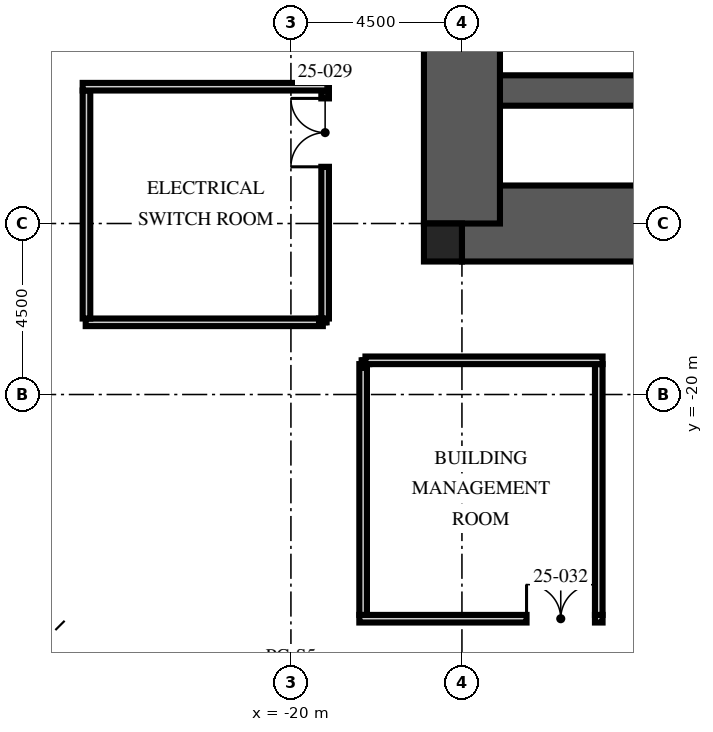
"""IFC4 building model, lengths in metres.
Left out: names, types, materials, properties, quantities, classifications, styles, units other than length and angle.
Written with IfcOpenShell. Run it as: python <this file> out.ifc"""

import sys

from ifc_helpers import new_model, si_unit, direction, frame, frame_2d, origin, origin_2d, place, context, subcontext, project, spatial, rectangle, hollow_rectangle, extrude, element, fill, save


model = new_model("IFC4")
c1 = context("Model", 3, precision=1e-05, world=origin(), true_north=direction((0.0, 1.0)))
c2 = subcontext(c1, "Body", "Model", "MODEL_VIEW")
j1 = project(units=[si_unit("LENGTHUNIT", "METRE"), si_unit("PLANEANGLEUNIT", "RADIAN")], contexts=[c1])
p1 = place(None, origin())
s1 = spatial("IfcSite", under=j1, at=p1, CompositionType="ELEMENT")
p2 = place(p1, origin())
s2 = spatial("IfcBuilding", under=s1, at=p2, CompositionType="ELEMENT")
p3 = place(p2, frame((0.0, 0.0, 99.75)))
s3 = spatial("IfcBuildingStorey", under=s2, at=p3, CompositionType="ELEMENT", Elevation=99.75)
p4 = place(p3, frame((-15.5, -15.5, -0.35), z_axis=(0.0, 0.0, 1.0), x_axis=(1.0, 0.0, 0.0)))
e1 = element("IfcWall", 1, at=p4, inside=s3, PredefinedType="SHEAR", context=c2, shape_type="SweptSolid", body=[
    extrude(rectangle(XDim=31.0, YDim=2.0, at=frame_2d((15.5, 0.0))), origin(), (0.0, 0.0, 1.0), 7.6),
])
p5 = place(p3, frame((-15.5, -12.0, -0.35), z_axis=(0.0, 0.0, 1.0), x_axis=(1.0, 0.0, 0.0)))
e2 = element("IfcWall", 2, at=p5, inside=s3, PredefinedType="SHEAR", context=c2, shape_type="SweptSolid", body=[
    extrude(rectangle(XDim=31.0, YDim=0.8, at=frame_2d((15.5, 0.0))), origin(), (0.0, 0.0, 1.0), 7.6),
])
p6 = place(p3, frame((-15.5, -15.5, -0.35), z_axis=(0.0, 0.0, 1.0), x_axis=(0.0, 1.0, 0.0)))
e3 = element("IfcWall", 3, at=p6, inside=s3, PredefinedType="SHEAR", context=c2, shape_type="SweptSolid", body=[
    extrude(rectangle(XDim=31.0, YDim=2.0, at=frame_2d((15.5, 0.0))), origin(), (0.0, 0.0, 1.0), 7.6),
])
p7 = place(p6, frame((6.5, 0.0, 0.35)))
e4 = element("IfcOpeningElement", 4, at=p7, cuts=e3, PredefinedType="OPENING", context=c2, shape_type="SweptSolid", body=[
    extrude(rectangle(XDim=1.2, YDim=2.1, at=frame_2d((0.6, 1.05))), frame((0.0, 1.01, 0.0), z_axis=(0.0, -1.0, 0.0), x_axis=(1.0, 0.0, 0.0)), (0.0, 0.0, 1.0), 2.02),
])
p8 = place(p6, frame((22.7, 0.0, 0.35)))
e5 = element("IfcOpeningElement", 5, at=p8, cuts=e3, PredefinedType="OPENING", context=c2, shape_type="SweptSolid", body=[
    extrude(rectangle(XDim=1.8, YDim=2.1, at=frame_2d((0.9, 1.05))), frame((0.0, 1.01, 0.0), z_axis=(0.0, -1.0, 0.0), x_axis=(1.0, 0.0, 0.0)), (0.0, 0.0, 1.0), 2.02),
])
p9 = place(p3, frame((-16.0, -16.0, -0.35), z_axis=(0.0, 0.0, 1.0), x_axis=(1.0, 0.0, 0.0)))
e6 = element("IfcColumn", 6, at=p9, inside=s3, PredefinedType="COLUMN", context=c2, shape_type="SweptSolid", body=[
    extrude(rectangle(XDim=1.0, YDim=1.0, at=origin_2d()), origin(), (0.0, 0.0, 1.0), 7.6),
])
p10 = place(p3, frame((-10.0, -29.8, -0.65), z_axis=(0.103601510687, 0.332963994967, 0.937230870724), x_axis=(0.994618884766, -0.034712905596, -0.097612951251)))
e7 = element("IfcColumn", 7, at=p10, inside=s3, PredefinedType="COLUMN", context=c2, shape_type="SweptSolid", body=[
    extrude(hollow_rectangle(XDim=3.2, YDim=1.8, WallThickness=0.2, at=origin_2d()), origin(), (0.0, 0.0, 1.0), 8.109),
])
for number, where, z_axis, x_axis in (
    (8, (-20.0, -29.8, -0.65), (0.204, 0.328, 0.923), (0.979, -0.068, -0.192)),
    (9, (-29.8, -20.0, -0.65), (0.328, 0.204, 0.923), (-0.068, 0.979, -0.192)),
):
    element("IfcColumn", number, at=place(p3, frame(where, z_axis=z_axis, x_axis=x_axis)), inside=s3, PredefinedType="COLUMN", context=c2, shape_type="SweptSolid", body=[
        extrude(hollow_rectangle(XDim=3.2, YDim=1.8, WallThickness=0.2, at=origin_2d()), origin(), (0.0, 0.0, 1.0), 8.238),
    ])
p11 = place(p3, frame((-29.8, -10.0, -0.65), z_axis=(0.332963994967, 0.103601510687, 0.937230870724), x_axis=(-0.034712905596, 0.994618884766, -0.097612951251)))
e10 = element("IfcColumn", 10, at=p11, inside=s3, PredefinedType="COLUMN", context=c2, shape_type="SweptSolid", body=[
    extrude(hollow_rectangle(XDim=3.2, YDim=1.8, WallThickness=0.2, at=origin_2d()), origin(), (0.0, 0.0, 1.0), 8.109),
])
p12 = place(p3, frame((-28.394, -28.394, -0.65), z_axis=(0.300622896132, 0.300622896132, 0.905125266824), x_axis=(0.707106781187, -0.707106781187, 0.0)))
e11 = element("IfcColumn", 11, at=p12, inside=s3, PredefinedType="COLUMN", context=c2, shape_type="SweptSolid", body=[
    extrude(hollow_rectangle(XDim=1.6, YDim=1.6, WallThickness=0.1, at=origin_2d()), origin(), (0.0, 0.0, 1.0), 8.396),
])
p13 = place(p3, frame((-18.2, -25.9, 0.0), z_axis=(0.0, 0.0, 1.0), x_axis=(1.0, 0.0, 0.0)))
e12 = element("IfcWall", 12, at=p13, inside=s3, PredefinedType="SOLIDWALL", context=c2, shape_type="SweptSolid", body=[
    extrude(rectangle(XDim=6.4, YDim=0.2, at=frame_2d((3.2, 0.0))), origin(), (0.0, 0.0, 1.0), 6.45),
])
p14 = place(p13, frame((4.4, 0.0, 0.0)))
e13 = element("IfcOpeningElement", 13, at=p14, cuts=e12, PredefinedType="OPENING", context=c2, shape_type="SweptSolid", body=[
    extrude(rectangle(XDim=1.8, YDim=2.4, at=frame_2d((0.9, 1.2))), frame((0.0, 0.11, 0.0), z_axis=(0.0, -1.0, 0.0), x_axis=(1.0, 0.0, 0.0)), (0.0, 0.0, 1.0), 0.22),
])
p15 = place(p3, frame((-18.1, -25.8, 0.0), z_axis=(0.0, 0.0, 1.0), x_axis=(0.0, 1.0, 0.0)))
e14 = element("IfcWall", 14, at=p15, inside=s3, PredefinedType="SOLIDWALL", context=c2, shape_type="SweptSolid", body=[
    extrude(rectangle(XDim=6.6, YDim=0.2, at=frame_2d((3.3, 0.0))), origin(), (0.0, 0.0, 1.0), 6.45),
])
p16 = place(p3, frame((-11.9, -25.8, 0.0), z_axis=(0.0, 0.0, 1.0), x_axis=(0.0, 1.0, 0.0)))
e15 = element("IfcWall", 15, at=p16, inside=s3, PredefinedType="SOLIDWALL", context=c2, shape_type="SweptSolid", body=[
    extrude(rectangle(XDim=6.6, YDim=0.2, at=frame_2d((3.3, 0.0))), origin(), (0.0, 0.0, 1.0), 7.25),
])
p17 = place(p3, frame((-18.039, -19.2, 0.0), z_axis=(0.0, 0.0, 1.0), x_axis=(-1.0, 0.0, 0.0)))
e16 = element("IfcWall", 16, at=p17, inside=s3, PredefinedType="SOLIDWALL", context=c2, shape_type="SweptSolid", body=[
    extrude(rectangle(XDim=0.061, YDim=0.2, at=frame_2d((0.03, 0.0))), origin(), (0.0, 0.0, 1.0), 7.25),
])
p18 = place(p3, frame((-18.039, -19.1, 0.0), z_axis=(0.0, 0.0, 1.0), x_axis=(0.0, -1.0, 0.0)))
e17 = element("IfcWall", 17, at=p18, inside=s3, PredefinedType="SOLIDWALL", context=c2, shape_type="SweptSolid", body=[
    extrude(rectangle(XDim=0.1, YDim=0.2, at=frame_2d((0.05, 0.0))), origin(), (0.0, 0.0, 1.0), 7.25),
])
p19 = place(p3, frame((-18.039, -19.1, 0.0), z_axis=(0.0, 0.0, 1.0), x_axis=(1.0, 0.0, 0.0)))
e18 = element("IfcWall", 18, at=p19, inside=s3, PredefinedType="SOLIDWALL", context=c2, shape_type="SweptSolid", body=[
    extrude(rectangle(XDim=6.239, YDim=0.2, at=frame_2d((3.12, 0.0))), origin(), (0.0, 0.0, 1.0), 6.46),
])
p20 = place(p3, frame((-25.4, -18.1, 0.0), z_axis=(0.0, 0.0, 1.0), x_axis=(1.0, 0.0, 0.0)))
e19 = element("IfcWall", 19, at=p20, inside=s3, PredefinedType="SOLIDWALL", context=c2, shape_type="SweptSolid", body=[
    extrude(rectangle(XDim=6.239, YDim=0.2, at=frame_2d((3.12, 0.0))), origin(), (0.0, 0.0, 1.0), 6.45),
])
p21 = place(p3, frame((-19.161, -18.1, 0.0), z_axis=(0.0, 0.0, 1.0), x_axis=(0.0, 1.0, 0.0)))
e20 = element("IfcWall", 20, at=p21, inside=s3, PredefinedType="SOLIDWALL", context=c2, shape_type="SweptSolid", body=[
    extrude(rectangle(XDim=0.1, YDim=0.2, at=frame_2d((0.05, 0.0))), origin(), (0.0, 0.0, 1.0), 7.25),
])
p22 = place(p3, frame((-25.38, -18.0, 0.0), z_axis=(0.0, 0.0, 1.0), x_axis=(0.0, 1.0, 0.0)))
e21 = element("IfcWall", 21, at=p22, inside=s3, PredefinedType="SOLIDWALL", context=c2, shape_type="SweptSolid", body=[
    extrude(rectangle(XDim=6.0, YDim=0.2, at=frame_2d((3.0, 0.0))), origin(), (0.0, 0.0, 1.0), 6.46),
])
p23 = place(p3, frame((-19.161, -18.0, 0.0), z_axis=(0.0, 0.0, 1.0), x_axis=(1.0, 0.0, 0.0)))
e22 = element("IfcWall", 22, at=p23, inside=s3, PredefinedType="SOLIDWALL", context=c2, shape_type="SweptSolid", body=[
    extrude(rectangle(XDim=0.061, YDim=0.2, at=frame_2d((0.03, 0.0))), origin(), (0.0, 0.0, 1.0), 7.25),
])
p24 = place(p3, frame((-19.1, -18.0, 0.0), z_axis=(0.0, 0.0, 1.0), x_axis=(0.0, 1.0, 0.0)))
e23 = element("IfcWall", 23, at=p24, inside=s3, PredefinedType="SOLIDWALL", context=c2, shape_type="SweptSolid", body=[
    extrude(rectangle(XDim=6.0, YDim=0.2, at=frame_2d((3.0, 0.0))), origin(), (0.0, 0.0, 1.0), 6.46),
])
p25 = place(p24, frame((3.992, 0.0, 0.0)))
e24 = element("IfcOpeningElement", 24, at=p25, cuts=e23, PredefinedType="OPENING", context=c2, shape_type="SweptSolid", body=[
    extrude(rectangle(XDim=1.8, YDim=2.4, at=frame_2d((0.9, 1.2))), frame((0.0, 0.11, 0.0), z_axis=(0.0, -1.0, 0.0), x_axis=(1.0, 0.0, 0.0)), (0.0, 0.0, 1.0), 0.22),
])
p26 = place(p3, frame((-25.48, -11.9, 0.0), z_axis=(0.0, 0.0, 1.0), x_axis=(1.0, 0.0, 0.0)))
e25 = element("IfcWall", 25, at=p26, inside=s3, PredefinedType="SOLIDWALL", context=c2, shape_type="SweptSolid", body=[
    extrude(rectangle(XDim=6.48, YDim=0.2, at=frame_2d((3.24, 0.0))), origin(), (0.0, 0.0, 1.0), 7.25),
])
p27 = place(p25, origin())
e26 = element("IfcDoor", 26, at=p27, inside=s3, OperationType="DOUBLE_DOOR_SINGLE_SWING", PredefinedType="DOOR", context=c2, shape_type="SweptSolid", body=[
    extrude(rectangle(XDim=1.8, YDim=2.4, at=frame_2d((0.9, 1.2))), frame((0.0, 0.025, 0.0), z_axis=(0.0, -1.0, 0.0), x_axis=(1.0, 0.0, 0.0)), (0.0, 0.0, 1.0), 0.05),
])
fill(e24, e26)
p28 = place(p14, origin())
e27 = element("IfcDoor", 27, at=p28, inside=s3, OperationType="DOUBLE_DOOR_SINGLE_SWING", PredefinedType="DOOR", context=c2, shape_type="SweptSolid", body=[
    extrude(rectangle(XDim=1.8, YDim=2.4, at=frame_2d((0.9, 1.2))), frame((0.0, 0.025, 0.0), z_axis=(0.0, -1.0, 0.0), x_axis=(1.0, 0.0, 0.0)), (0.0, 0.0, 1.0), 0.05),
])
fill(e13, e27)
save(model, sys.argv[1])
